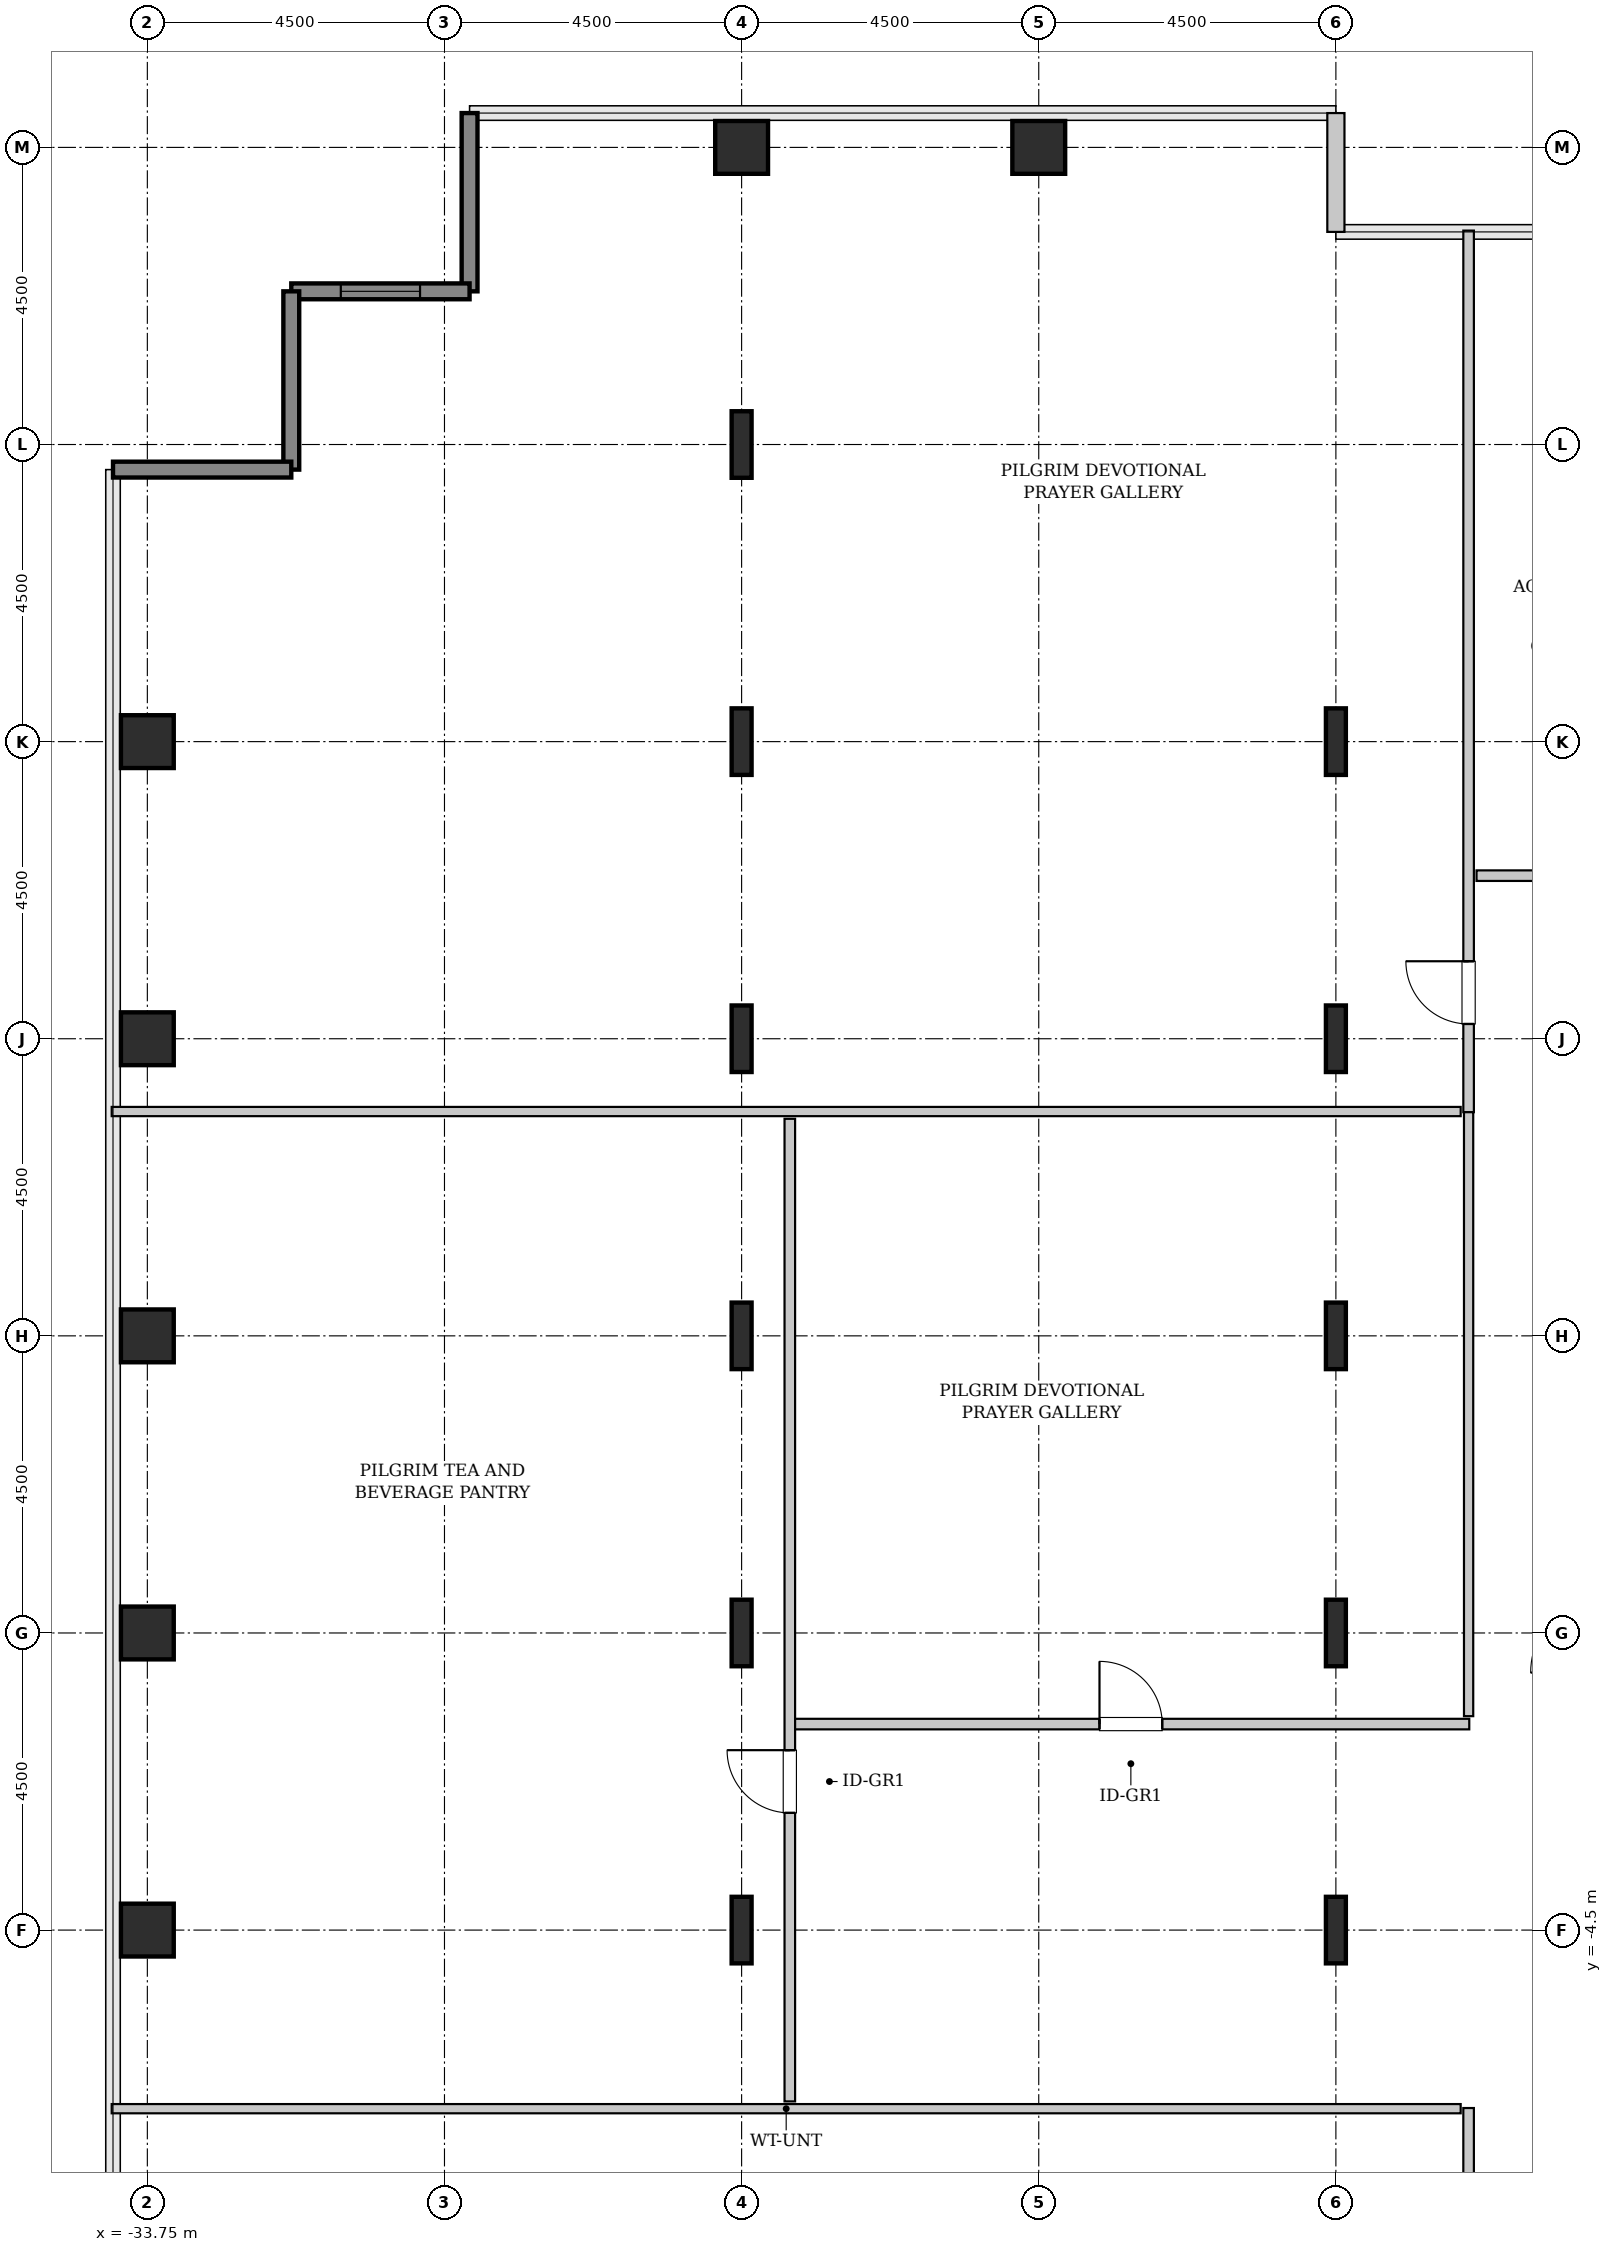
"""IFC4 building model, lengths in metres.
Left out: names, types, materials, properties, quantities, classifications, styles, units other than length and angle.
Written with IfcOpenShell. Run it as: python <this file> out.ifc"""

import sys

from ifc_helpers import new_model, si_unit, direction, frame, frame_2d, origin, origin_2d, place, context, subcontext, project, spatial, rectangle, hollow_rectangle, i_section, extrude, source, transform, mapped, element, fill, save


model = new_model("IFC4")
c1 = context("Model", 3, precision=1e-05, world=origin(), true_north=direction((0.0, 1.0)))
c2 = subcontext(c1, "Body", "Model", "MODEL_VIEW")
j1 = project(units=[si_unit("LENGTHUNIT", "METRE"), si_unit("PLANEANGLEUNIT", "RADIAN")], contexts=[c1])
p1 = place(None, origin())
s1 = spatial("IfcSite", under=j1, at=p1, CompositionType="ELEMENT")
p2 = place(p1, origin())
s2 = spatial("IfcBuilding", under=s1, at=p2, CompositionType="ELEMENT")
p3 = place(p2, frame((0.0, 0.0, 140.2)))
s3 = spatial("IfcBuildingStorey", under=s2, at=p3, CompositionType="ELEMENT", Elevation=140.2)
m1 = source(origin(), c2, "Body", "SweptSolid", [
    extrude(hollow_rectangle(XDim=0.8, YDim=0.8, WallThickness=0.04, InnerFilletRadius=0.04, OuterFilletRadius=0.08, at=origin_2d()), origin(), (0.0, 0.0, 1.0), 3.8),
])
for number, where, z_axis, x_axis in (
    (1, (-33.75, -4.5, 0.0), (0.0, 0.0, 1.0), (1.0, 0.0, 0.0)),
    (2, (-33.75, 0.0, 0.0), (0.0, 0.0, 1.0), (1.0, 0.0, 0.0)),
    (3, (-33.75, 4.5, 0.0), (0.0, 0.0, 1.0), (1.0, 0.0, 0.0)),
    (4, (-33.75, 9.0, 0.0), (0.0, 0.0, 1.0), (1.0, 0.0, 0.0)),
    (5, (-33.75, 13.5, 0.0), (0.0, 0.0, 1.0), (1.0, 0.0, 0.0)),
):
    element("IfcColumn", number, at=place(p3, frame(where, z_axis=z_axis, x_axis=x_axis)), inside=s3, PredefinedType="COLUMN", context=c2, shape_type="MappedRepresentation", body=[
        mapped(m1, transform((0.0, 0.0, 0.0), x_axis=(1.0, 0.0, 0.0), y_axis=(0.0, 1.0, 0.0), z_axis=(0.0, 0.0, 1.0), scale=1.0)),
    ])
m2 = source(origin(), c2, "Body", "SweptSolid", [
    extrude(i_section(OverallWidth=0.302, OverallDepth=1.008, WebThickness=0.021, FlangeThickness=0.04, FilletRadius=0.03, at=origin_2d()), origin(), (0.0, 0.0, 1.0), 3.8),
])
for number, where, z_axis, x_axis in (
    (6, (-24.75, -4.5, 0.0), (0.0, 0.0, 1.0), (1.0, 0.0, 0.0)),
    (7, (-24.75, 0.0, 0.0), (0.0, 0.0, 1.0), (1.0, 0.0, 0.0)),
    (8, (-24.75, 4.5, 0.0), (0.0, 0.0, 1.0), (1.0, 0.0, 0.0)),
    (9, (-24.75, 9.0, 0.0), (0.0, 0.0, 1.0), (1.0, 0.0, 0.0)),
    (10, (-24.75, 13.5, 0.0), (0.0, 0.0, 1.0), (1.0, 0.0, 0.0)),
    (11, (-24.75, 18.0, 0.0), (0.0, 0.0, 1.0), (1.0, 0.0, 0.0)),
):
    element("IfcColumn", number, at=place(p3, frame(where, z_axis=z_axis, x_axis=x_axis)), inside=s3, PredefinedType="COLUMN", context=c2, shape_type="MappedRepresentation", body=[
        mapped(m2, transform((0.0, 0.0, 0.0), x_axis=(1.0, 0.0, 0.0), y_axis=(0.0, 1.0, 0.0), z_axis=(0.0, 0.0, 1.0), scale=1.0)),
    ])
for number, where, z_axis, x_axis in (
    (12, (-24.75, 22.5, 0.0), (0.0, 0.0, 1.0), (1.0, 0.0, 0.0)),
    (13, (-20.25, 22.5, 0.0), (0.0, 0.0, 1.0), (1.0, 0.0, 0.0)),
):
    element("IfcColumn", number, at=place(p3, frame(where, z_axis=z_axis, x_axis=x_axis)), inside=s3, PredefinedType="COLUMN", context=c2, shape_type="MappedRepresentation", body=[
        mapped(m1, transform((0.0, 0.0, 0.0), x_axis=(1.0, 0.0, 0.0), y_axis=(0.0, 1.0, 0.0), z_axis=(0.0, 0.0, 1.0), scale=1.0)),
    ])
for number, where, z_axis, x_axis in (
    (14, (-15.75, -4.5, 0.0), (0.0, 0.0, 1.0), (1.0, 0.0, 0.0)),
    (15, (-15.75, 0.0, 0.0), (0.0, 0.0, 1.0), (1.0, 0.0, 0.0)),
    (16, (-15.75, 4.5, 0.0), (0.0, 0.0, 1.0), (1.0, 0.0, 0.0)),
    (17, (-15.75, 9.0, 0.0), (0.0, 0.0, 1.0), (1.0, 0.0, 0.0)),
    (18, (-15.75, 13.5, 0.0), (0.0, 0.0, 1.0), (1.0, 0.0, 0.0)),
):
    element("IfcColumn", number, at=place(p3, frame(where, z_axis=z_axis, x_axis=x_axis)), inside=s3, PredefinedType="COLUMN", context=c2, shape_type="MappedRepresentation", body=[
        mapped(m2, transform((0.0, 0.0, 0.0), x_axis=(1.0, 0.0, 0.0), y_axis=(0.0, 1.0, 0.0), z_axis=(0.0, 0.0, 1.0), scale=1.0)),
    ])
m3 = source(origin(), c2, "Body", "SweptSolid", [
    extrude(rectangle(XDim=1.8, YDim=0.26, at=frame_2d((0.9, 0.0))), origin(), (0.0, 0.0, 1.0), 3.5),
])
p4 = place(p3, frame((-15.75, 21.22, 0.0), z_axis=(0.0, 0.0, 1.0), x_axis=(0.0, 1.0, 0.0)))
e19 = element("IfcWall", 19, at=p4, inside=s3, PredefinedType="SOLIDWALL", context=c2, shape_type="MappedRepresentation", body=[
    mapped(m3, transform((0.0, 0.0, 0.0), x_axis=(1.0, 0.0, 0.0), y_axis=(0.0, 1.0, 0.0), z_axis=(0.0, 0.0, 1.0), scale=1.0)),
])
m4 = source(origin(), c2, "Body", "SweptSolid", [
    extrude(rectangle(XDim=2.7, YDim=0.24, at=frame_2d((1.35, 0.0))), origin(), (0.0, 0.0, 1.0), 3.5),
])
p5 = place(p3, frame((-28.87, 23.02, 0.0), z_axis=(0.0, 0.0, 1.0), x_axis=(0.0, -1.0, 0.0)))
e20 = element("IfcWall", 20, at=p5, inside=s3, PredefinedType="SHEAR", context=c2, shape_type="MappedRepresentation", body=[
    mapped(m4, transform((0.0, 0.0, 0.0), x_axis=(1.0, 0.0, 0.0), y_axis=(0.0, 1.0, 0.0), z_axis=(0.0, 0.0, 1.0), scale=1.0)),
])
p6 = place(p3, frame((-28.87, 20.32, 0.0), z_axis=(0.0, 0.0, 1.0), x_axis=(-1.0, 0.0, 0.0)))
e21 = element("IfcWall", 21, at=p6, inside=s3, PredefinedType="SHEAR", context=c2, shape_type="MappedRepresentation", body=[
    mapped(m4, transform((0.0, 0.0, 0.0), x_axis=(1.0, 0.0, 0.0), y_axis=(0.0, 1.0, 0.0), z_axis=(0.0, 0.0, 1.0), scale=1.0)),
])
p7 = place(p6, frame((0.75, 0.0, 0.85)))
e22 = element("IfcOpeningElement", 22, at=p7, cuts=e21, PredefinedType="OPENING", context=c2, shape_type="SweptSolid", body=[
    extrude(rectangle(XDim=1.2, YDim=1.8, at=frame_2d((0.6, 0.9))), frame((0.0, 0.13, 0.0), z_axis=(0.0, -1.0, 0.0), x_axis=(1.0, 0.0, 0.0)), (0.0, 0.0, 1.0), 0.26),
])
for number, where, z_axis, x_axis in (
    (23, (-31.57, 20.32, 0.0), (0.0, 0.0, 1.0), (0.0, -1.0, 0.0)),
    (24, (-31.57, 17.62, 0.0), (0.0, 0.0, 1.0), (-1.0, 0.0, 0.0)),
):
    element("IfcWall", number, at=place(p3, frame(where, z_axis=z_axis, x_axis=x_axis)), inside=s3, PredefinedType="SHEAR", context=c2, shape_type="MappedRepresentation", body=[
        mapped(m4, transform((0.0, 0.0, 0.0), x_axis=(1.0, 0.0, 0.0), y_axis=(0.0, 1.0, 0.0), z_axis=(0.0, 0.0, 1.0), scale=1.0)),
    ])
m5 = source(origin(), c2, "Body", "SweptSolid", [
    extrude(rectangle(XDim=14.045, YDim=0.16, at=frame_2d((7.022, 0.0))), origin(), (0.0, 0.0, 1.0), 3.485),
])
p8 = place(p3, frame((-13.74, -21.24, 0.0), z_axis=(0.0, 0.0, 1.0), x_axis=(0.0, 1.0, 0.0)))
e25 = element("IfcWall", 25, at=p8, inside=s3, PredefinedType="PARTITIONING", context=c2, shape_type="MappedRepresentation", body=[
    mapped(m5, transform((0.0, 0.0, 0.0), x_axis=(1.0, 0.0, 0.0), y_axis=(0.0, 1.0, 0.0), z_axis=(0.0, 0.0, 1.0), scale=1.0)),
])
p9 = place(p8, frame((11.413, 0.0, 0.0)))
e26 = element("IfcOpeningElement", 26, at=p9, cuts=e25, PredefinedType="OPENING", context=c2, shape_type="SweptSolid", body=[
    extrude(rectangle(XDim=0.95, YDim=2.1, at=frame_2d((0.475, 1.05))), frame((0.0, 0.09, 0.0), z_axis=(0.0, -1.0, 0.0), x_axis=(1.0, 0.0, 0.0)), (0.0, 0.0, 1.0), 0.18),
])
m6 = source(origin(), c2, "Body", "SweptSolid", [
    extrude(rectangle(XDim=20.43, YDim=0.14, at=frame_2d((10.215, 0.0))), origin(), (0.0, 0.0, 1.0), 3.485),
])
p10 = place(p3, frame((-34.29, -7.205, 0.0), z_axis=(0.0, 0.0, 1.0), x_axis=(1.0, 0.0, 0.0)))
e27 = element("IfcWall", 27, at=p10, inside=s3, PredefinedType="PARTITIONING", context=c2, shape_type="MappedRepresentation", body=[
    mapped(m6, transform((0.0, 0.0, 0.0), x_axis=(1.0, 0.0, 0.0), y_axis=(0.0, 1.0, 0.0), z_axis=(0.0, 0.0, 1.0), scale=1.0)),
])
m7 = source(origin(), c2, "Body", "SweptSolid", [
    extrude(rectangle(XDim=13.353, YDim=0.16, at=frame_2d((6.676, 0.0))), origin(), (0.0, 0.0, 1.0), 3.485),
])
p11 = place(p3, frame((-13.74, 7.887, 0.0), z_axis=(0.0, 0.0, 1.0), x_axis=(0.0, 1.0, 0.0)))
e28 = element("IfcWall", 28, at=p11, inside=s3, PredefinedType="PARTITIONING", context=c2, shape_type="MappedRepresentation", body=[
    mapped(m7, transform((0.0, 0.0, 0.0), x_axis=(1.0, 0.0, 0.0), y_axis=(0.0, 1.0, 0.0), z_axis=(0.0, 0.0, 1.0), scale=1.0)),
])
p12 = place(p11, frame((1.336, 0.0, 0.0)))
e29 = element("IfcOpeningElement", 29, at=p12, cuts=e28, PredefinedType="OPENING", context=c2, shape_type="SweptSolid", body=[
    extrude(rectangle(XDim=0.95, YDim=2.1, at=frame_2d((0.475, 1.05))), frame((0.0, 0.09, 0.0), z_axis=(0.0, -1.0, 0.0), x_axis=(1.0, 0.0, 0.0)), (0.0, 0.0, 1.0), 0.18),
])
p13 = place(p3, frame((-34.29, 7.897, 0.0), z_axis=(0.0, 0.0, 1.0), x_axis=(1.0, 0.0, 0.0)))
e30 = element("IfcWall", 30, at=p13, inside=s3, PredefinedType="PARTITIONING", context=c2, shape_type="MappedRepresentation", body=[
    mapped(m6, transform((0.0, 0.0, 0.0), x_axis=(1.0, 0.0, 0.0), y_axis=(0.0, 1.0, 0.0), z_axis=(0.0, 0.0, 1.0), scale=1.0)),
])
m8 = source(origin(), c2, "Body", "SweptSolid", [
    extrude(rectangle(XDim=10.25, YDim=0.16, at=frame_2d((5.125, 0.0))), origin(), (0.0, 0.0, 1.0), 3.485),
])
p14 = place(p3, frame((-23.98, -1.38, 0.0), z_axis=(0.0, 0.0, 1.0), x_axis=(1.0, 0.0, 0.0)))
e31 = element("IfcWall", 31, at=p14, inside=s3, PredefinedType="PARTITIONING", context=c2, shape_type="MappedRepresentation", body=[
    mapped(m8, transform((0.0, 0.0, 0.0), x_axis=(1.0, 0.0, 0.0), y_axis=(0.0, 1.0, 0.0), z_axis=(0.0, 0.0, 1.0), scale=1.0)),
])
p15 = place(p14, frame((4.65, 0.0, 0.0)))
e32 = element("IfcOpeningElement", 32, at=p15, cuts=e31, PredefinedType="OPENING", context=c2, shape_type="SweptSolid", body=[
    extrude(rectangle(XDim=0.95, YDim=2.1, at=frame_2d((0.475, 1.05))), frame((0.0, 0.09, 0.0), z_axis=(0.0, -1.0, 0.0), x_axis=(1.0, 0.0, 0.0)), (0.0, 0.0, 1.0), 0.18),
])
m9 = source(origin(), c2, "Body", "SweptSolid", [
    extrude(rectangle(XDim=9.147, YDim=0.14, at=frame_2d((4.574, 0.0))), origin(), (0.0, 0.0, 1.0), 3.485),
])
p16 = place(p3, frame((-13.74, -1.26, 0.0), z_axis=(0.0, 0.0, 1.0), x_axis=(0.0, 1.0, 0.0)))
e33 = element("IfcWall", 33, at=p16, inside=s3, PredefinedType="PARTITIONING", context=c2, shape_type="MappedRepresentation", body=[
    mapped(m9, transform((0.0, 0.0, 0.0), x_axis=(1.0, 0.0, 0.0), y_axis=(0.0, 1.0, 0.0), z_axis=(0.0, 0.0, 1.0), scale=1.0)),
])
m10 = source(origin(), c2, "Body", "SweptSolid", [
    extrude(rectangle(XDim=14.883, YDim=0.16, at=frame_2d((7.441, 0.0))), origin(), (0.0, 0.0, 1.0), 3.485),
])
p17 = place(p3, frame((-24.02, -7.095, 0.0), z_axis=(0.0, 0.0, 1.0), x_axis=(0.0, 1.0, 0.0)))
e34 = element("IfcWall", 34, at=p17, inside=s3, PredefinedType="PARTITIONING", context=c2, shape_type="MappedRepresentation", body=[
    mapped(m10, transform((0.0, 0.0, 0.0), x_axis=(1.0, 0.0, 0.0), y_axis=(0.0, 1.0, 0.0), z_axis=(0.0, 0.0, 1.0), scale=1.0)),
])
p18 = place(p17, frame((4.37, 0.0, 0.0)))
e35 = element("IfcOpeningElement", 35, at=p18, cuts=e34, PredefinedType="OPENING", context=c2, shape_type="SweptSolid", body=[
    extrude(rectangle(XDim=0.95, YDim=2.1, at=frame_2d((0.475, 1.05))), frame((0.0, 0.09, 0.0), z_axis=(0.0, -1.0, 0.0), x_axis=(1.0, 0.0, 0.0)), (0.0, 0.0, 1.0), 0.18),
])
m11 = source(origin(), c2, "Body", "SweptSolid", [
    extrude(rectangle(XDim=4.125, YDim=0.16, at=frame_2d((2.062, 0.0))), origin(), (0.0, 0.0, 1.0), 3.485),
])
p19 = place(p3, frame((-13.62, 11.47, 0.0), z_axis=(0.0, 0.0, 1.0), x_axis=(1.0, 0.0, 0.0)))
e36 = element("IfcWall", 36, at=p19, inside=s3, PredefinedType="PARTITIONING", context=c2, shape_type="MappedRepresentation", body=[
    mapped(m11, transform((0.0, 0.0, 0.0), x_axis=(1.0, 0.0, 0.0), y_axis=(0.0, 1.0, 0.0), z_axis=(0.0, 0.0, 1.0), scale=1.0)),
])
p20 = place(p19, frame((1.587, 0.0, 0.0)))
e37 = element("IfcOpeningElement", 37, at=p20, cuts=e36, PredefinedType="OPENING", context=c2, shape_type="SweptSolid", body=[
    extrude(rectangle(XDim=0.95, YDim=2.1, at=frame_2d((0.475, 1.05))), frame((0.0, 0.09, 0.0), z_axis=(0.0, -1.0, 0.0), x_axis=(1.0, 0.0, 0.0)), (0.0, 0.0, 1.0), 0.18),
])
m12 = source(origin(), c2, "Body", "SweptSolid", [
    extrude(rectangle(XDim=1.2, YDim=1.8, at=frame_2d((0.6, 0.9))), frame((0.0, 0.03, 0.0), z_axis=(0.0, -1.0, 0.0), x_axis=(1.0, 0.0, 0.0)), (0.0, 0.0, 1.0), 0.06),
])
p21 = place(p7, origin())
e38 = element("IfcWindow", 38, at=p21, inside=s3, PartitioningType="SINGLE_PANEL", PredefinedType="WINDOW", context=c2, shape_type="MappedRepresentation", body=[
    mapped(m12, transform((0.0, 0.0, 0.0), x_axis=(1.0, 0.0, 0.0), y_axis=(0.0, 1.0, 0.0), z_axis=(0.0, 0.0, 1.0), scale=1.0)),
])
fill(e22, e38)
m13 = source(origin(), c2, "Body", "SweptSolid", [
    extrude(rectangle(XDim=0.95, YDim=2.1, at=frame_2d((0.475, 1.05))), frame((0.0, 0.025, 0.0), z_axis=(0.0, -1.0, 0.0), x_axis=(1.0, 0.0, 0.0)), (0.0, 0.0, 1.0), 0.05),
])
p22 = place(p12, origin())
e39 = element("IfcDoor", 39, at=p22, inside=s3, OperationType="SINGLE_SWING_RIGHT", PredefinedType="DOOR", context=c2, shape_type="MappedRepresentation", body=[
    mapped(m13, transform((0.0, 0.0, 0.0), x_axis=(1.0, 0.0, 0.0), y_axis=(0.0, 1.0, 0.0), z_axis=(0.0, 0.0, 1.0), scale=1.0)),
])
fill(e29, e39)
p23 = place(p15, origin())
e40 = element("IfcDoor", 40, at=p23, inside=s3, OperationType="SINGLE_SWING_LEFT", PredefinedType="DOOR", context=c2, shape_type="MappedRepresentation", body=[
    mapped(m13, transform((0.0, 0.0, 0.0), x_axis=(1.0, 0.0, 0.0), y_axis=(0.0, 1.0, 0.0), z_axis=(0.0, 0.0, 1.0), scale=1.0)),
])
fill(e32, e40)
p24 = place(p18, origin())
e41 = element("IfcDoor", 41, at=p24, inside=s3, OperationType="SINGLE_SWING_RIGHT", PredefinedType="DOOR", context=c2, shape_type="MappedRepresentation", body=[
    mapped(m13, transform((0.0, 0.0, 0.0), x_axis=(1.0, 0.0, 0.0), y_axis=(0.0, 1.0, 0.0), z_axis=(0.0, 0.0, 1.0), scale=1.0)),
])
fill(e35, e41)
save(model, sys.argv[1])
